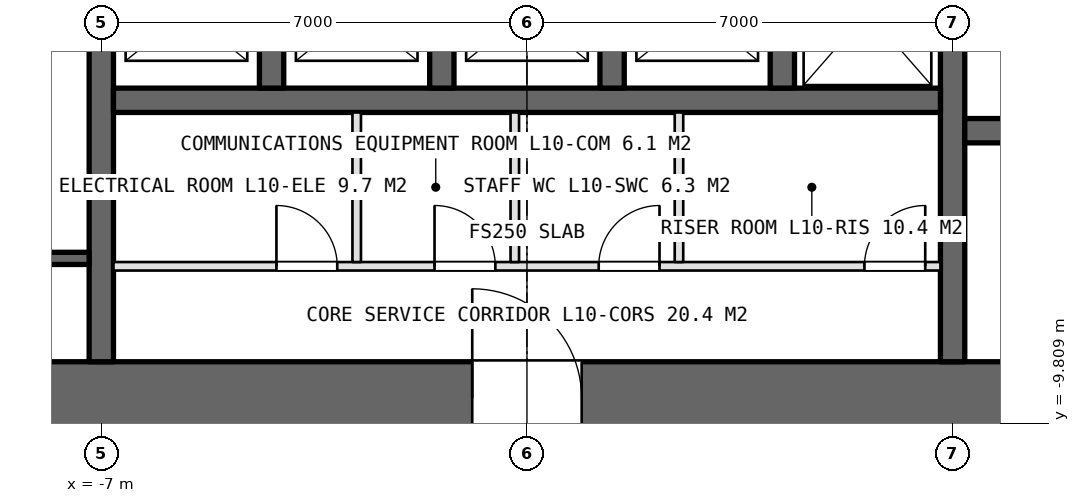
"""IFC4 building model, lengths in metres.
Left out: names, types, materials, properties, quantities, classifications, styles, units other than length and angle.
Written with IfcOpenShell. Run it as: python <this file> out.ifc"""

import sys

from ifc_helpers import new_model, si_unit, direction, frame, frame_2d, origin, place, context, subcontext, project, spatial, rectangle, extrude, element, fill, save


model = new_model("IFC4")
c1 = context("Model", 3, precision=1e-05, world=origin(), true_north=direction((0.0, 1.0)))
c2 = subcontext(c1, "Body", "Model", "MODEL_VIEW")
j1 = project(units=[si_unit("LENGTHUNIT", "METRE"), si_unit("PLANEANGLEUNIT", "RADIAN")], contexts=[c1])
p1 = place(None, origin())
s1 = spatial("IfcSite", under=j1, at=p1, CompositionType="ELEMENT")
p2 = place(p1, origin())
s2 = spatial("IfcBuilding", under=s1, at=p2, CompositionType="ELEMENT")
p3 = place(p2, frame((0.0, 0.0, 50.0)))
s3 = spatial("IfcBuildingStorey", under=s2, at=p3, CompositionType="ELEMENT", Elevation=50.0)
p4 = place(p3, frame((-14.0, -9.4, 0.0), z_axis=(0.0, 0.0, 1.0), x_axis=(1.0, 0.0, 0.0)))
e1 = element("IfcWall", 1, at=p4, inside=s3, PredefinedType="SHEAR", context=c2, shape_type="SweptSolid", body=[
    extrude(rectangle(XDim=28.0, YDim=1.2, at=frame_2d((14.0, 0.0))), origin(), (0.0, 0.0, 1.0), 5.0),
])
p5 = place(p4, frame((13.1, 0.0, 0.0)))
e2 = element("IfcOpeningElement", 2, at=p5, cuts=e1, PredefinedType="OPENING", context=c2, shape_type="SweptSolid", body=[
    extrude(rectangle(XDim=1.8, YDim=2.4, at=frame_2d((0.9, 1.2))), frame((0.0, 0.61, 0.0), z_axis=(0.0, -1.0, 0.0), x_axis=(1.0, 0.0, 0.0)), (0.0, 0.0, 1.0), 1.22),
])
p6 = place(p4, frame((22.9, 0.0, 0.0)))
e3 = element("IfcOpeningElement", 3, at=p6, cuts=e1, PredefinedType="OPENING", context=c2, shape_type="SweptSolid", body=[
    extrude(rectangle(XDim=2.2, YDim=2.7, at=frame_2d((1.1, 1.35))), frame((0.0, 0.61, 0.0), z_axis=(0.0, -1.0, 0.0), x_axis=(1.0, 0.0, 0.0)), (0.0, 0.0, 1.0), 1.22),
])
p7 = place(p3, frame((-7.0, -8.8, 0.0), z_axis=(0.0, 0.0, 1.0), x_axis=(0.0, 1.0, 0.0)))
e4 = element("IfcWall", 4, at=p7, inside=s3, PredefinedType="SHEAR", context=c2, shape_type="SweptSolid", body=[
    extrude(rectangle(XDim=17.6, YDim=0.4, at=frame_2d((8.8, 0.0))), origin(), (0.0, 0.0, 1.0), 5.0),
])
p8 = place(p7, frame((7.9, 0.0, 0.0)))
e5 = element("IfcOpeningElement", 5, at=p8, cuts=e4, PredefinedType="OPENING", context=c2, shape_type="SweptSolid", body=[
    extrude(rectangle(XDim=1.8, YDim=2.4, at=frame_2d((0.9, 1.2))), frame((0.0, 0.21, 0.0), z_axis=(0.0, -1.0, 0.0), x_axis=(1.0, 0.0, 0.0)), (0.0, 0.0, 1.0), 0.42),
])
p9 = place(p3, frame((7.0, -8.8, 0.0), z_axis=(0.0, 0.0, 1.0), x_axis=(0.0, 1.0, 0.0)))
e6 = element("IfcWall", 6, at=p9, inside=s3, PredefinedType="SHEAR", context=c2, shape_type="SweptSolid", body=[
    extrude(rectangle(XDim=17.6, YDim=0.4, at=frame_2d((8.8, 0.0))), origin(), (0.0, 0.0, 1.0), 5.0),
])
p10 = place(p9, frame((7.9, 0.0, 0.0)))
e7 = element("IfcOpeningElement", 7, at=p10, cuts=e6, PredefinedType="OPENING", context=c2, shape_type="SweptSolid", body=[
    extrude(rectangle(XDim=1.8, YDim=2.4, at=frame_2d((0.9, 1.2))), frame((0.0, 0.21, 0.0), z_axis=(0.0, -1.0, 0.0), x_axis=(1.0, 0.0, 0.0)), (0.0, 0.0, 1.0), 0.42),
])
p11 = place(p3, frame((-6.8, -4.5, 0.0), z_axis=(0.0, 0.0, 1.0), x_axis=(1.0, 0.0, 0.0)))
e8 = element("IfcWall", 8, at=p11, inside=s3, PredefinedType="SHEAR", context=c2, shape_type="SweptSolid", body=[
    extrude(rectangle(XDim=13.6, YDim=0.4, at=frame_2d((6.8, 0.0))), origin(), (0.0, 0.0, 1.0), 5.0),
])
p12 = place(p3, frame((7.2, -5.0, 0.0), z_axis=(0.0, 0.0, 1.0), x_axis=(1.0, 0.0, 0.0)))
e9 = element("IfcWall", 9, at=p12, inside=s3, PredefinedType="SHEAR", context=c2, shape_type="SweptSolid", body=[
    extrude(rectangle(XDim=5.6, YDim=0.4, at=frame_2d((2.8, 0.0))), origin(), (0.0, 0.0, 1.0), 5.0),
])
for number, where, z_axis, x_axis in (
    (10, (-4.2, -4.3, 0.0), (0.0, 0.0, 1.0), (0.0, 1.0, 0.0)),
    (11, (-1.4, -4.3, 0.0), (0.0, 0.0, 1.0), (0.0, 1.0, 0.0)),
    (12, (1.4, -4.3, 0.0), (0.0, 0.0, 1.0), (0.0, 1.0, 0.0)),
    (13, (4.2, -4.3, 0.0), (0.0, 0.0, 1.0), (0.0, 1.0, 0.0)),
):
    element("IfcWall", number, at=place(p3, frame(where, z_axis=z_axis, x_axis=x_axis)), inside=s3, PredefinedType="SHEAR", context=c2, shape_type="SweptSolid", body=[
        extrude(rectangle(XDim=2.5, YDim=0.4, at=frame_2d((1.25, 0.0))), origin(), (0.0, 0.0, 1.0), 5.0),
    ])
p13 = place(p3, frame((-6.8, -7.23, 0.0), z_axis=(0.0, 0.0, 1.0), x_axis=(1.0, 0.0, 0.0)))
e14 = element("IfcWall", 14, at=p13, inside=s3, PredefinedType="PARTITIONING", context=c2, shape_type="SweptSolid", body=[
    extrude(rectangle(XDim=13.6, YDim=0.14, at=frame_2d((6.8, 0.0))), origin(), (0.0, 0.0, 1.0), 4.75),
])
p14 = place(p13, frame((2.68, 0.0, 0.0)))
e15 = element("IfcOpeningElement", 15, at=p14, cuts=e14, PredefinedType="OPENING", context=c2, shape_type="SweptSolid", body=[
    extrude(rectangle(XDim=1.0, YDim=2.4, at=frame_2d((0.5, 1.2))), frame((0.0, 0.08, 0.0), z_axis=(0.0, -1.0, 0.0), x_axis=(1.0, 0.0, 0.0)), (0.0, 0.0, 1.0), 0.16),
])
p15 = place(p13, frame((5.28, 0.0, 0.0)))
e16 = element("IfcOpeningElement", 16, at=p15, cuts=e14, PredefinedType="OPENING", context=c2, shape_type="SweptSolid", body=[
    extrude(rectangle(XDim=1.0, YDim=2.4, at=frame_2d((0.5, 1.2))), frame((0.0, 0.08, 0.0), z_axis=(0.0, -1.0, 0.0), x_axis=(1.0, 0.0, 0.0)), (0.0, 0.0, 1.0), 0.16),
])
p16 = place(p13, frame((7.98, 0.0, 0.0)))
e17 = element("IfcOpeningElement", 17, at=p16, cuts=e14, PredefinedType="OPENING", context=c2, shape_type="SweptSolid", body=[
    extrude(rectangle(XDim=1.0, YDim=2.4, at=frame_2d((0.5, 1.2))), frame((0.0, 0.08, 0.0), z_axis=(0.0, -1.0, 0.0), x_axis=(1.0, 0.0, 0.0)), (0.0, 0.0, 1.0), 0.16),
])
p17 = place(p13, frame((12.35, 0.0, 0.0)))
e18 = element("IfcOpeningElement", 18, at=p17, cuts=e14, PredefinedType="OPENING", context=c2, shape_type="SweptSolid", body=[
    extrude(rectangle(XDim=1.0, YDim=2.4, at=frame_2d((0.5, 1.2))), frame((0.0, 0.08, 0.0), z_axis=(0.0, -1.0, 0.0), x_axis=(1.0, 0.0, 0.0)), (0.0, 0.0, 1.0), 0.16),
])
for number, where, z_axis, x_axis in (
    (19, (-2.8, -4.7, 0.0), (0.0, 0.0, 1.0), (0.0, -1.0, 0.0)),
    (20, (-0.2, -4.7, 0.0), (0.0, 0.0, 1.0), (0.0, -1.0, 0.0)),
    (21, (2.5, -4.7, 0.0), (0.0, 0.0, 1.0), (0.0, -1.0, 0.0)),
):
    element("IfcWall", number, at=place(p3, frame(where, z_axis=z_axis, x_axis=x_axis)), inside=s3, PredefinedType="PARTITIONING", context=c2, shape_type="SweptSolid", body=[
        extrude(rectangle(XDim=2.46, YDim=0.14, at=frame_2d((1.23, 0.0))), origin(), (0.0, 0.0, 1.0), 4.75),
    ])
p18 = place(p3, frame((-9.15, -7.1, 0.0), z_axis=(0.0, 0.0, 1.0), x_axis=(1.0, 0.0, 0.0)))
e22 = element("IfcWall", 22, at=p18, inside=s3, PredefinedType="SOLIDWALL", context=c2, shape_type="SweptSolid", body=[
    extrude(rectangle(XDim=1.95, YDim=0.2, at=frame_2d((0.975, 0.0))), origin(), (0.0, 0.0, 1.0), 5.0),
])
p19 = place(p14, origin())
e23 = element("IfcDoor", 23, at=p19, inside=s3, OperationType="SINGLE_SWING_LEFT", PredefinedType="DOOR", context=c2, shape_type="SweptSolid", body=[
    extrude(rectangle(XDim=1.0, YDim=2.4, at=frame_2d((0.5, 1.2))), frame((0.0, 0.025, 0.0), z_axis=(0.0, -1.0, 0.0), x_axis=(1.0, 0.0, 0.0)), (0.0, 0.0, 1.0), 0.05),
])
fill(e15, e23)
p20 = place(p15, origin())
e24 = element("IfcDoor", 24, at=p20, inside=s3, OperationType="SINGLE_SWING_LEFT", PredefinedType="DOOR", context=c2, shape_type="SweptSolid", body=[
    extrude(rectangle(XDim=1.0, YDim=2.4, at=frame_2d((0.5, 1.2))), frame((0.0, 0.025, 0.0), z_axis=(0.0, -1.0, 0.0), x_axis=(1.0, 0.0, 0.0)), (0.0, 0.0, 1.0), 0.05),
])
fill(e16, e24)
p21 = place(p16, origin())
e25 = element("IfcDoor", 25, at=p21, inside=s3, OperationType="SINGLE_SWING_RIGHT", PredefinedType="DOOR", context=c2, shape_type="SweptSolid", body=[
    extrude(rectangle(XDim=1.0, YDim=2.4, at=frame_2d((0.5, 1.2))), frame((0.0, 0.025, 0.0), z_axis=(0.0, -1.0, 0.0), x_axis=(1.0, 0.0, 0.0)), (0.0, 0.0, 1.0), 0.05),
])
fill(e17, e25)
p22 = place(p17, origin())
e26 = element("IfcDoor", 26, at=p22, inside=s3, OperationType="SINGLE_SWING_RIGHT", PredefinedType="DOOR", context=c2, shape_type="SweptSolid", body=[
    extrude(rectangle(XDim=1.0, YDim=2.4, at=frame_2d((0.5, 1.2))), frame((0.0, 0.025, 0.0), z_axis=(0.0, -1.0, 0.0), x_axis=(1.0, 0.0, 0.0)), (0.0, 0.0, 1.0), 0.05),
])
fill(e18, e26)
p23 = place(p5, origin())
e27 = element("IfcDoor", 27, at=p23, inside=s3, OperationType="DOUBLE_DOOR_SINGLE_SWING", PredefinedType="DOOR", context=c2, shape_type="SweptSolid", body=[
    extrude(rectangle(XDim=1.8, YDim=2.4, at=frame_2d((0.9, 1.2))), frame((0.0, 0.025, 0.0), z_axis=(0.0, -1.0, 0.0), x_axis=(1.0, 0.0, 0.0)), (0.0, 0.0, 1.0), 0.05),
])
fill(e2, e27)
save(model, sys.argv[1])
